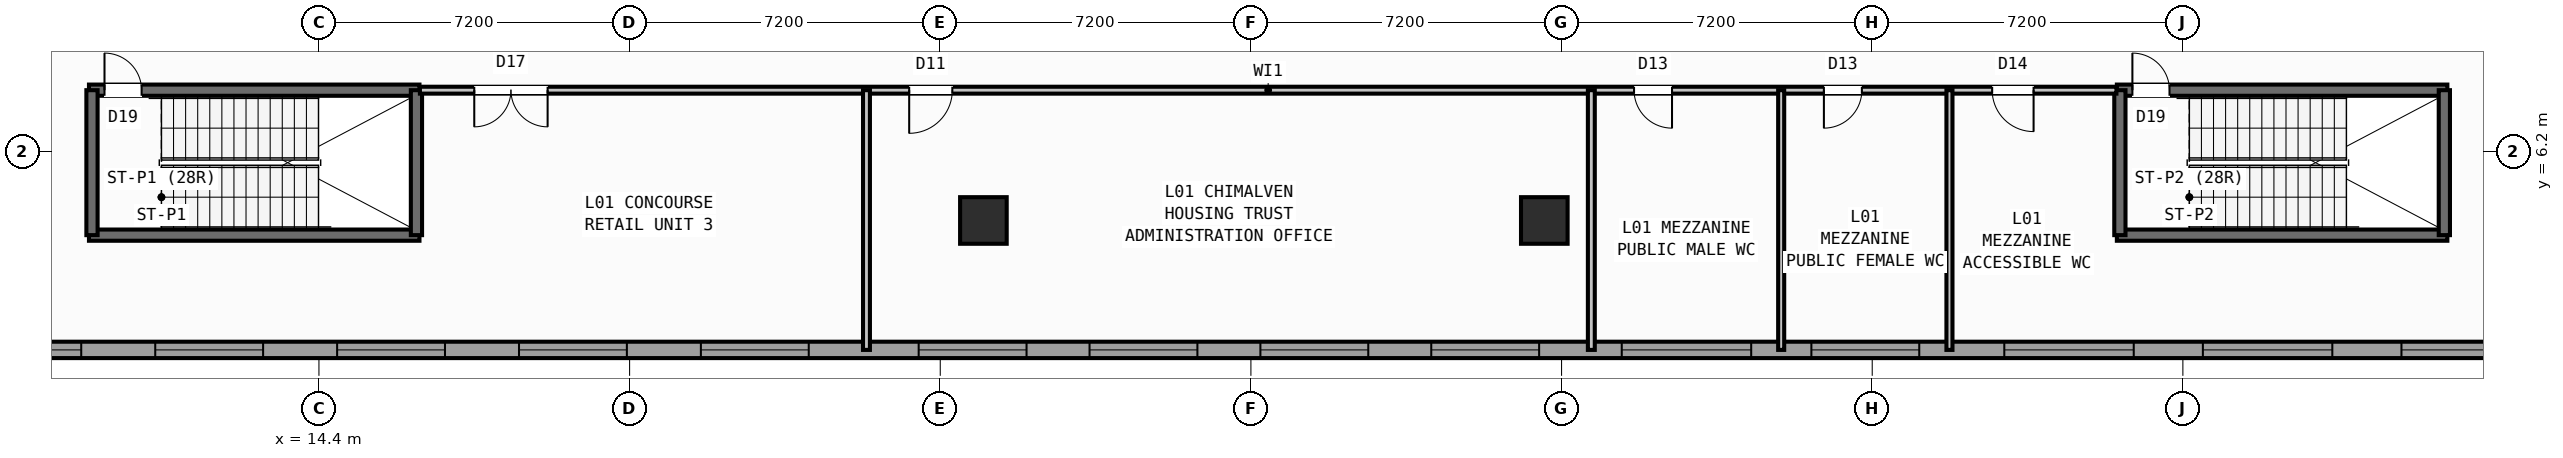
"""IFC4 building model, lengths in metres.
Left out: names, types, materials, properties, quantities, classifications, styles, units other than length and angle.
Written with IfcOpenShell. Run it as: python <this file> out.ifc"""

import sys

from ifc_helpers import new_model, si_unit, direction, frame, frame_2d, origin, origin_2d, place, context, subcontext, project, spatial, rectangle, hollow_rectangle, extrude, source, transform, mapped, element, fill, save


model = new_model("IFC4")
c1 = context("Model", 3, precision=1e-05, world=origin(), true_north=direction((0.0, 1.0)))
c2 = subcontext(c1, "Body", "Model", "MODEL_VIEW")
j1 = project(units=[si_unit("LENGTHUNIT", "METRE"), si_unit("PLANEANGLEUNIT", "RADIAN")], contexts=[c1])
p1 = place(None, origin())
s1 = spatial("IfcSite", under=j1, at=p1, CompositionType="ELEMENT")
p2 = place(p1, origin())
s2 = spatial("IfcBuilding", under=s1, at=p2, CompositionType="ELEMENT")
p3 = place(p2, frame((0.0, 0.0, 5.4)))
s3 = spatial("IfcBuildingStorey", under=s2, at=p3, CompositionType="ELEMENT", Elevation=5.4)
m1 = source(origin(), c2, "Body", "SweptSolid", [
    extrude(hollow_rectangle(XDim=1.08, YDim=1.08, WallThickness=0.04, at=origin_2d()), origin(), (0.0, 0.0, 1.0), 4.8),
])
for number, where, z_axis, x_axis in (
    (1, (29.8, 4.6, 0.0), (0.0, 0.0, 1.0), (1.0, 0.0, 0.0)),
    (2, (42.8, 4.6, 0.0), (0.0, 0.0, 1.0), (1.0, 0.0, 0.0)),
):
    element("IfcColumn", number, at=place(p3, frame(where, z_axis=z_axis, x_axis=x_axis)), inside=s3, PredefinedType="COLUMN", context=c2, shape_type="MappedRepresentation", body=[
        mapped(m1, transform((0.0, 0.0, 0.0), scale=1.0)),
    ])
p4 = place(p3, frame((67.117, 1.6, 0.0), z_axis=(0.0, 0.0, 1.0), x_axis=(-1.0, 0.0, 0.0)))
e3 = element("IfcWall", 3, at=p4, inside=s3, PredefinedType="STANDARD", context=c2, shape_type="SweptSolid", body=[
    extrude(rectangle(XDim=62.234, YDim=0.38, at=frame_2d((31.117, 0.0))), origin(), (0.0, 0.0, 1.0), 4.45),
])
p5 = place(p4, frame((1.451, 0.0, 0.7)))
e4 = element("IfcOpeningElement", 4, at=p5, cuts=e3, PredefinedType="OPENING", context=c2, shape_type="SweptSolid", body=[
    extrude(rectangle(XDim=3.0, YDim=2.3, at=frame_2d((1.5, 1.15))), frame((0.0, 0.2, 0.0), z_axis=(0.0, -1.0, 0.0), x_axis=(1.0, 0.0, 0.0)), (0.0, 0.0, 1.0), 0.4),
])
p6 = place(p4, frame((6.054, 0.0, 0.7)))
e5 = element("IfcOpeningElement", 5, at=p6, cuts=e3, PredefinedType="OPENING", context=c2, shape_type="SweptSolid", body=[
    extrude(rectangle(XDim=3.0, YDim=2.3, at=frame_2d((1.5, 1.15))), frame((0.0, 0.2, 0.0), z_axis=(0.0, -1.0, 0.0), x_axis=(1.0, 0.0, 0.0)), (0.0, 0.0, 1.0), 0.4),
])
p7 = place(p4, frame((10.656, 0.0, 0.7)))
e6 = element("IfcOpeningElement", 6, at=p7, cuts=e3, PredefinedType="OPENING", context=c2, shape_type="SweptSolid", body=[
    extrude(rectangle(XDim=3.0, YDim=2.3, at=frame_2d((1.5, 1.15))), frame((0.0, 0.2, 0.0), z_axis=(0.0, -1.0, 0.0), x_axis=(1.0, 0.0, 0.0)), (0.0, 0.0, 1.0), 0.4),
])
p8 = place(p4, frame((15.627, 0.0, 0.9)))
e7 = element("IfcOpeningElement", 7, at=p8, cuts=e3, PredefinedType="OPENING", context=c2, shape_type="SweptSolid", body=[
    extrude(rectangle(XDim=2.5, YDim=1.9, at=frame_2d((1.25, 0.95))), frame((0.0, 0.2, 0.0), z_axis=(0.0, -1.0, 0.0), x_axis=(1.0, 0.0, 0.0)), (0.0, 0.0, 1.0), 0.4),
])
p9 = place(p4, frame((19.522, 0.0, 0.7)))
e8 = element("IfcOpeningElement", 8, at=p9, cuts=e3, PredefinedType="OPENING", context=c2, shape_type="SweptSolid", body=[
    extrude(rectangle(XDim=3.0, YDim=2.3, at=frame_2d((1.5, 1.15))), frame((0.0, 0.2, 0.0), z_axis=(0.0, -1.0, 0.0), x_axis=(1.0, 0.0, 0.0)), (0.0, 0.0, 1.0), 0.4),
])
p10 = place(p4, frame((24.437, 0.0, 0.9)))
e9 = element("IfcOpeningElement", 9, at=p10, cuts=e3, PredefinedType="OPENING", context=c2, shape_type="SweptSolid", body=[
    extrude(rectangle(XDim=2.5, YDim=1.9, at=frame_2d((1.25, 0.95))), frame((0.0, 0.2, 0.0), z_axis=(0.0, -1.0, 0.0), x_axis=(1.0, 0.0, 0.0)), (0.0, 0.0, 1.0), 0.4),
])
p11 = place(p4, frame((28.397, 0.0, 0.9)))
e10 = element("IfcOpeningElement", 10, at=p11, cuts=e3, PredefinedType="OPENING", context=c2, shape_type="SweptSolid", body=[
    extrude(rectangle(XDim=2.5, YDim=1.9, at=frame_2d((1.25, 0.95))), frame((0.0, 0.2, 0.0), z_axis=(0.0, -1.0, 0.0), x_axis=(1.0, 0.0, 0.0)), (0.0, 0.0, 1.0), 0.4),
])
p12 = place(p4, frame((32.357, 0.0, 0.9)))
e11 = element("IfcOpeningElement", 11, at=p12, cuts=e3, PredefinedType="OPENING", context=c2, shape_type="SweptSolid", body=[
    extrude(rectangle(XDim=2.5, YDim=1.9, at=frame_2d((1.25, 0.95))), frame((0.0, 0.2, 0.0), z_axis=(0.0, -1.0, 0.0), x_axis=(1.0, 0.0, 0.0)), (0.0, 0.0, 1.0), 0.4),
])
p13 = place(p4, frame((36.317, 0.0, 0.9)))
e12 = element("IfcOpeningElement", 12, at=p13, cuts=e3, PredefinedType="OPENING", context=c2, shape_type="SweptSolid", body=[
    extrude(rectangle(XDim=2.5, YDim=1.9, at=frame_2d((1.25, 0.95))), frame((0.0, 0.2, 0.0), z_axis=(0.0, -1.0, 0.0), x_axis=(1.0, 0.0, 0.0)), (0.0, 0.0, 1.0), 0.4),
])
p14 = place(p4, frame((41.365, 0.0, 0.9)))
e13 = element("IfcOpeningElement", 13, at=p14, cuts=e3, PredefinedType="OPENING", context=c2, shape_type="SweptSolid", body=[
    extrude(rectangle(XDim=2.5, YDim=1.9, at=frame_2d((1.25, 0.95))), frame((0.0, 0.2, 0.0), z_axis=(0.0, -1.0, 0.0), x_axis=(1.0, 0.0, 0.0)), (0.0, 0.0, 1.0), 0.4),
])
p15 = place(p4, frame((45.58, 0.0, 0.9)))
e14 = element("IfcOpeningElement", 14, at=p15, cuts=e3, PredefinedType="OPENING", context=c2, shape_type="SweptSolid", body=[
    extrude(rectangle(XDim=2.5, YDim=1.9, at=frame_2d((1.25, 0.95))), frame((0.0, 0.2, 0.0), z_axis=(0.0, -1.0, 0.0), x_axis=(1.0, 0.0, 0.0)), (0.0, 0.0, 1.0), 0.4),
])
p16 = place(p4, frame((49.796, 0.0, 0.9)))
e15 = element("IfcOpeningElement", 15, at=p16, cuts=e3, PredefinedType="OPENING", context=c2, shape_type="SweptSolid", body=[
    extrude(rectangle(XDim=2.5, YDim=1.9, at=frame_2d((1.25, 0.95))), frame((0.0, 0.2, 0.0), z_axis=(0.0, -1.0, 0.0), x_axis=(1.0, 0.0, 0.0)), (0.0, 0.0, 1.0), 0.4),
])
p17 = place(p4, frame((54.011, 0.0, 0.9)))
e16 = element("IfcOpeningElement", 16, at=p17, cuts=e3, PredefinedType="OPENING", context=c2, shape_type="SweptSolid", body=[
    extrude(rectangle(XDim=2.5, YDim=1.9, at=frame_2d((1.25, 0.95))), frame((0.0, 0.2, 0.0), z_axis=(0.0, -1.0, 0.0), x_axis=(1.0, 0.0, 0.0)), (0.0, 0.0, 1.0), 0.4),
])
p18 = place(p4, frame((58.227, 0.0, 0.9)))
e17 = element("IfcOpeningElement", 17, at=p18, cuts=e3, PredefinedType="OPENING", context=c2, shape_type="SweptSolid", body=[
    extrude(rectangle(XDim=2.5, YDim=1.9, at=frame_2d((1.25, 0.95))), frame((0.0, 0.2, 0.0), z_axis=(0.0, -1.0, 0.0), x_axis=(1.0, 0.0, 0.0)), (0.0, 0.0, 1.0), 0.4),
])
p19 = place(p3, frame((9.07, 7.62, 0.0), z_axis=(0.0, 0.0, 1.0), x_axis=(1.0, 0.0, 0.0)))
e18 = element("IfcWall", 18, at=p19, inside=s3, PredefinedType="SHEAR", context=c2, shape_type="SweptSolid", body=[
    extrude(rectangle(XDim=7.66, YDim=0.26, at=frame_2d((3.83, 0.0))), origin(), (0.0, 0.0, 1.0), 4.6),
])
p20 = place(p19, frame((0.36, 0.0, 0.0)))
e19 = element("IfcOpeningElement", 19, at=p20, cuts=e18, PredefinedType="OPENING", context=c2, shape_type="SweptSolid", body=[
    extrude(rectangle(XDim=0.86, YDim=2.05, at=frame_2d((0.43, 1.025))), frame((0.0, 0.14, 0.0), z_axis=(0.0, -1.0, 0.0), x_axis=(1.0, 0.0, 0.0)), (0.0, 0.0, 1.0), 0.28),
])
p21 = place(p3, frame((9.07, 4.26, 0.0), z_axis=(0.0, 0.0, 1.0), x_axis=(1.0, 0.0, 0.0)))
e20 = element("IfcWall", 20, at=p21, inside=s3, PredefinedType="SHEAR", context=c2, shape_type="SweptSolid", body=[
    extrude(rectangle(XDim=7.66, YDim=0.26, at=frame_2d((3.83, 0.0))), origin(), (0.0, 0.0, 1.0), 4.6),
])
for number, where, z_axis, x_axis in (
    (21, (9.14, 4.26, 0.0), (0.0, 0.0, 1.0), (0.0, 1.0, 0.0)),
    (22, (16.66, 4.26, 0.0), (0.0, 0.0, 1.0), (0.0, 1.0, 0.0)),
):
    element("IfcWall", number, at=place(p3, frame(where, z_axis=z_axis, x_axis=x_axis)), inside=s3, PredefinedType="SHEAR", context=c2, shape_type="SweptSolid", body=[
        extrude(rectangle(XDim=3.36, YDim=0.26, at=frame_2d((1.68, 0.0))), origin(), (0.0, 0.0, 1.0), 4.6),
    ])
p22 = place(p3, frame((56.07, 7.62, 0.0), z_axis=(0.0, 0.0, 1.0), x_axis=(1.0, 0.0, 0.0)))
e23 = element("IfcWall", 23, at=p22, inside=s3, PredefinedType="SHEAR", context=c2, shape_type="SweptSolid", body=[
    extrude(rectangle(XDim=7.66, YDim=0.26, at=frame_2d((3.83, 0.0))), origin(), (0.0, 0.0, 1.0), 4.6),
])
p23 = place(p22, frame((0.36, 0.0, 0.0)))
e24 = element("IfcOpeningElement", 24, at=p23, cuts=e23, PredefinedType="OPENING", context=c2, shape_type="SweptSolid", body=[
    extrude(rectangle(XDim=0.86, YDim=2.05, at=frame_2d((0.43, 1.025))), frame((0.0, 0.14, 0.0), z_axis=(0.0, -1.0, 0.0), x_axis=(1.0, 0.0, 0.0)), (0.0, 0.0, 1.0), 0.28),
])
p24 = place(p3, frame((56.07, 4.26, 0.0), z_axis=(0.0, 0.0, 1.0), x_axis=(1.0, 0.0, 0.0)))
e25 = element("IfcWall", 25, at=p24, inside=s3, PredefinedType="SHEAR", context=c2, shape_type="SweptSolid", body=[
    extrude(rectangle(XDim=7.66, YDim=0.26, at=frame_2d((3.83, 0.0))), origin(), (0.0, 0.0, 1.0), 4.6),
])
for number, where, z_axis, x_axis in (
    (26, (56.14, 4.26, 0.0), (0.0, 0.0, 1.0), (0.0, 1.0, 0.0)),
    (27, (63.66, 4.26, 0.0), (0.0, 0.0, 1.0), (0.0, 1.0, 0.0)),
):
    element("IfcWall", number, at=place(p3, frame(where, z_axis=z_axis, x_axis=x_axis)), inside=s3, PredefinedType="SHEAR", context=c2, shape_type="SweptSolid", body=[
        extrude(rectangle(XDim=3.36, YDim=0.26, at=frame_2d((1.68, 0.0))), origin(), (0.0, 0.0, 1.0), 4.6),
    ])
p25 = place(p3, frame((16.74, 7.62, 0.0), z_axis=(0.0, 0.0, 1.0), x_axis=(1.0, 0.0, 0.0)))
e28 = element("IfcWall", 28, at=p25, inside=s3, PredefinedType="PARTITIONING", context=c2, shape_type="SweptSolid", body=[
    extrude(rectangle(XDim=39.32, YDim=0.16, at=frame_2d((19.66, 0.0))), origin(), (0.0, 0.0, 1.0), 4.44),
])
p26 = place(p25, frame((1.26, 0.0, 0.0)))
e29 = element("IfcOpeningElement", 29, at=p26, cuts=e28, PredefinedType="OPENING", context=c2, shape_type="SweptSolid", body=[
    extrude(rectangle(XDim=1.7, YDim=2.2, at=frame_2d((0.85, 1.1))), frame((0.0, 0.09, 0.0), z_axis=(0.0, -1.0, 0.0), x_axis=(1.0, 0.0, 0.0)), (0.0, 0.0, 1.0), 0.18),
])
p27 = place(p25, frame((11.34, 0.0, 0.0)))
e30 = element("IfcOpeningElement", 30, at=p27, cuts=e28, PredefinedType="OPENING", context=c2, shape_type="SweptSolid", body=[
    extrude(rectangle(XDim=1.0, YDim=2.1, at=frame_2d((0.5, 1.05))), frame((0.0, 0.09, 0.0), z_axis=(0.0, -1.0, 0.0), x_axis=(1.0, 0.0, 0.0)), (0.0, 0.0, 1.0), 0.18),
])
p28 = place(p25, frame((28.14, 0.0, 0.0)))
e31 = element("IfcOpeningElement", 31, at=p28, cuts=e28, PredefinedType="OPENING", context=c2, shape_type="SweptSolid", body=[
    extrude(rectangle(XDim=0.88, YDim=2.08, at=frame_2d((0.44, 1.04))), frame((0.0, 0.09, 0.0), z_axis=(0.0, -1.0, 0.0), x_axis=(1.0, 0.0, 0.0)), (0.0, 0.0, 1.0), 0.18),
])
p29 = place(p25, frame((32.54, 0.0, 0.0)))
e32 = element("IfcOpeningElement", 32, at=p29, cuts=e28, PredefinedType="OPENING", context=c2, shape_type="SweptSolid", body=[
    extrude(rectangle(XDim=0.88, YDim=2.08, at=frame_2d((0.44, 1.04))), frame((0.0, 0.09, 0.0), z_axis=(0.0, -1.0, 0.0), x_axis=(1.0, 0.0, 0.0)), (0.0, 0.0, 1.0), 0.18),
])
p30 = place(p25, frame((36.44, 0.0, 0.0)))
e33 = element("IfcOpeningElement", 33, at=p30, cuts=e28, PredefinedType="OPENING", context=c2, shape_type="SweptSolid", body=[
    extrude(rectangle(XDim=0.96, YDim=2.08, at=frame_2d((0.48, 1.04))), frame((0.0, 0.09, 0.0), z_axis=(0.0, -1.0, 0.0), x_axis=(1.0, 0.0, 0.0)), (0.0, 0.0, 1.0), 0.18),
])
for number, where, z_axis, x_axis in (
    (34, (27.09, 1.6, 0.0), (0.0, 0.0, 1.0), (0.0, 1.0, 0.0)),
    (35, (43.89, 1.6, 0.0), (0.0, 0.0, 1.0), (0.0, 1.0, 0.0)),
):
    element("IfcWall", number, at=place(p3, frame(where, z_axis=z_axis, x_axis=x_axis)), inside=s3, PredefinedType="PARTITIONING", context=c2, shape_type="SweptSolid", body=[
        extrude(rectangle(XDim=6.02, YDim=0.16, at=frame_2d((3.01, 0.0))), origin(), (0.0, 0.0, 1.0), 4.44),
    ])
for number, where, z_axis, x_axis in (
    (36, (48.29, 1.6, 0.0), (0.0, 0.0, 1.0), (0.0, 1.0, 0.0)),
    (37, (52.19, 1.6, 0.0), (0.0, 0.0, 1.0), (0.0, 1.0, 0.0)),
):
    element("IfcWall", number, at=place(p3, frame(where, z_axis=z_axis, x_axis=x_axis)), inside=s3, PredefinedType="PLUMBINGWALL", context=c2, shape_type="SweptSolid", body=[
        extrude(rectangle(XDim=6.02, YDim=0.14, at=frame_2d((3.01, 0.0))), origin(), (0.0, 0.0, 1.0), 4.44),
    ])
m2 = source(origin(), c2, "Body", "SweptSolid", [
    extrude(rectangle(XDim=3.0, YDim=2.3, at=frame_2d((1.5, 1.15))), frame((0.0, 0.03, 0.0), z_axis=(0.0, -1.0, 0.0), x_axis=(1.0, 0.0, 0.0)), (0.0, 0.0, 1.0), 0.06),
])
p31 = place(p5, origin())
e38 = element("IfcWindow", 38, at=p31, inside=s3, PartitioningType="SINGLE_PANEL", PredefinedType="WINDOW", context=c2, shape_type="MappedRepresentation", body=[
    mapped(m2, transform((0.0, 0.0, 0.0), scale=1.0)),
])
fill(e4, e38)
p32 = place(p6, origin())
e39 = element("IfcWindow", 39, at=p32, inside=s3, PartitioningType="SINGLE_PANEL", PredefinedType="WINDOW", context=c2, shape_type="MappedRepresentation", body=[
    mapped(m2, transform((0.0, 0.0, 0.0), scale=1.0)),
])
fill(e5, e39)
p33 = place(p7, origin())
e40 = element("IfcWindow", 40, at=p33, inside=s3, PartitioningType="SINGLE_PANEL", PredefinedType="WINDOW", context=c2, shape_type="MappedRepresentation", body=[
    mapped(m2, transform((0.0, 0.0, 0.0), scale=1.0)),
])
fill(e6, e40)
m3 = source(origin(), c2, "Body", "SweptSolid", [
    extrude(rectangle(XDim=2.5, YDim=1.9, at=frame_2d((1.25, 0.95))), frame((0.0, 0.03, 0.0), z_axis=(0.0, -1.0, 0.0), x_axis=(1.0, 0.0, 0.0)), (0.0, 0.0, 1.0), 0.06),
])
p34 = place(p8, origin())
e41 = element("IfcWindow", 41, at=p34, inside=s3, PartitioningType="SINGLE_PANEL", PredefinedType="WINDOW", context=c2, shape_type="MappedRepresentation", body=[
    mapped(m3, transform((0.0, 0.0, 0.0), scale=1.0)),
])
fill(e7, e41)
p35 = place(p9, origin())
e42 = element("IfcWindow", 42, at=p35, inside=s3, PartitioningType="SINGLE_PANEL", PredefinedType="WINDOW", context=c2, shape_type="MappedRepresentation", body=[
    mapped(m2, transform((0.0, 0.0, 0.0), scale=1.0)),
])
fill(e8, e42)
p36 = place(p10, origin())
e43 = element("IfcWindow", 43, at=p36, inside=s3, PartitioningType="SINGLE_PANEL", PredefinedType="WINDOW", context=c2, shape_type="MappedRepresentation", body=[
    mapped(m3, transform((0.0, 0.0, 0.0), scale=1.0)),
])
fill(e9, e43)
p37 = place(p11, origin())
e44 = element("IfcWindow", 44, at=p37, inside=s3, PartitioningType="SINGLE_PANEL", PredefinedType="WINDOW", context=c2, shape_type="MappedRepresentation", body=[
    mapped(m3, transform((0.0, 0.0, 0.0), scale=1.0)),
])
fill(e10, e44)
p38 = place(p12, origin())
e45 = element("IfcWindow", 45, at=p38, inside=s3, PartitioningType="SINGLE_PANEL", PredefinedType="WINDOW", context=c2, shape_type="MappedRepresentation", body=[
    mapped(m3, transform((0.0, 0.0, 0.0), scale=1.0)),
])
fill(e11, e45)
p39 = place(p13, origin())
e46 = element("IfcWindow", 46, at=p39, inside=s3, PartitioningType="SINGLE_PANEL", PredefinedType="WINDOW", context=c2, shape_type="MappedRepresentation", body=[
    mapped(m3, transform((0.0, 0.0, 0.0), scale=1.0)),
])
fill(e12, e46)
p40 = place(p14, origin())
e47 = element("IfcWindow", 47, at=p40, inside=s3, PartitioningType="SINGLE_PANEL", PredefinedType="WINDOW", context=c2, shape_type="MappedRepresentation", body=[
    mapped(m3, transform((0.0, 0.0, 0.0), scale=1.0)),
])
fill(e13, e47)
p41 = place(p15, origin())
e48 = element("IfcWindow", 48, at=p41, inside=s3, PartitioningType="SINGLE_PANEL", PredefinedType="WINDOW", context=c2, shape_type="MappedRepresentation", body=[
    mapped(m3, transform((0.0, 0.0, 0.0), scale=1.0)),
])
fill(e14, e48)
p42 = place(p16, origin())
e49 = element("IfcWindow", 49, at=p42, inside=s3, PartitioningType="SINGLE_PANEL", PredefinedType="WINDOW", context=c2, shape_type="MappedRepresentation", body=[
    mapped(m3, transform((0.0, 0.0, 0.0), scale=1.0)),
])
fill(e15, e49)
p43 = place(p17, origin())
e50 = element("IfcWindow", 50, at=p43, inside=s3, PartitioningType="SINGLE_PANEL", PredefinedType="WINDOW", context=c2, shape_type="MappedRepresentation", body=[
    mapped(m3, transform((0.0, 0.0, 0.0), scale=1.0)),
])
fill(e16, e50)
p44 = place(p18, origin())
e51 = element("IfcWindow", 51, at=p44, inside=s3, PartitioningType="SINGLE_PANEL", PredefinedType="WINDOW", context=c2, shape_type="MappedRepresentation", body=[
    mapped(m3, transform((0.0, 0.0, 0.0), scale=1.0)),
])
fill(e17, e51)
m4 = source(origin(), c2, "Body", "SweptSolid", [
    extrude(rectangle(XDim=0.86, YDim=2.05, at=frame_2d((0.43, 1.025))), frame((0.0, 0.025, 0.0), z_axis=(0.0, -1.0, 0.0), x_axis=(1.0, 0.0, 0.0)), (0.0, 0.0, 1.0), 0.05),
])
p45 = place(p20, origin())
e52 = element("IfcDoor", 52, at=p45, inside=s3, OperationType="SINGLE_SWING_LEFT", PredefinedType="DOOR", context=c2, shape_type="MappedRepresentation", body=[
    mapped(m4, transform((0.0, 0.0, 0.0), scale=1.0)),
])
fill(e19, e52)
p46 = place(p23, origin())
e53 = element("IfcDoor", 53, at=p46, inside=s3, OperationType="SINGLE_SWING_LEFT", PredefinedType="DOOR", context=c2, shape_type="MappedRepresentation", body=[
    mapped(m4, transform((0.0, 0.0, 0.0), scale=1.0)),
])
fill(e24, e53)
m5 = source(origin(), c2, "Body", "SweptSolid", [
    extrude(rectangle(XDim=1.7, YDim=2.2, at=frame_2d((0.85, 1.1))), frame((0.0, 0.025, 0.0), z_axis=(0.0, -1.0, 0.0), x_axis=(1.0, 0.0, 0.0)), (0.0, 0.0, 1.0), 0.05),
])
p47 = place(p26, frame((1.7, 0.0, 0.0), z_axis=(0.0, 0.0, 1.0), x_axis=(-1.0, 0.0, 0.0)))
e54 = element("IfcDoor", 54, at=p47, inside=s3, OperationType="DOUBLE_DOOR_SINGLE_SWING", PredefinedType="DOOR", context=c2, shape_type="MappedRepresentation", body=[
    mapped(m5, transform((0.0, 0.0, 0.0), scale=1.0)),
])
fill(e29, e54)
m6 = source(origin(), c2, "Body", "SweptSolid", [
    extrude(rectangle(XDim=1.0, YDim=2.1, at=frame_2d((0.5, 1.05))), frame((0.0, 0.025, 0.0), z_axis=(0.0, -1.0, 0.0), x_axis=(1.0, 0.0, 0.0)), (0.0, 0.0, 1.0), 0.05),
])
p48 = place(p27, frame((1.0, 0.0, 0.0), z_axis=(0.0, 0.0, 1.0), x_axis=(-1.0, 0.0, 0.0)))
e55 = element("IfcDoor", 55, at=p48, inside=s3, OperationType="SINGLE_SWING_RIGHT", PredefinedType="DOOR", context=c2, shape_type="MappedRepresentation", body=[
    mapped(m6, transform((0.0, 0.0, 0.0), scale=1.0)),
])
fill(e30, e55)
m7 = source(origin(), c2, "Body", "SweptSolid", [
    extrude(rectangle(XDim=0.88, YDim=2.08, at=frame_2d((0.44, 1.04))), frame((0.0, 0.025, 0.0), z_axis=(0.0, -1.0, 0.0), x_axis=(1.0, 0.0, 0.0)), (0.0, 0.0, 1.0), 0.05),
])
p49 = place(p28, frame((0.88, 0.0, 0.0), z_axis=(0.0, 0.0, 1.0), x_axis=(-1.0, 0.0, 0.0)))
e56 = element("IfcDoor", 56, at=p49, inside=s3, OperationType="SINGLE_SWING_LEFT", PredefinedType="DOOR", context=c2, shape_type="MappedRepresentation", body=[
    mapped(m7, transform((0.0, 0.0, 0.0), scale=1.0)),
])
fill(e31, e56)
p50 = place(p29, frame((0.88, 0.0, 0.0), z_axis=(0.0, 0.0, 1.0), x_axis=(-1.0, 0.0, 0.0)))
e57 = element("IfcDoor", 57, at=p50, inside=s3, OperationType="SINGLE_SWING_RIGHT", PredefinedType="DOOR", context=c2, shape_type="MappedRepresentation", body=[
    mapped(m7, transform((0.0, 0.0, 0.0), scale=1.0)),
])
fill(e32, e57)
m8 = source(origin(), c2, "Body", "SweptSolid", [
    extrude(rectangle(XDim=0.96, YDim=2.08, at=frame_2d((0.48, 1.04))), frame((0.0, 0.025, 0.0), z_axis=(0.0, -1.0, 0.0), x_axis=(1.0, 0.0, 0.0)), (0.0, 0.0, 1.0), 0.05),
])
p51 = place(p30, frame((0.96, 0.0, 0.0), z_axis=(0.0, 0.0, 1.0), x_axis=(-1.0, 0.0, 0.0)))
e58 = element("IfcDoor", 58, at=p51, inside=s3, OperationType="SINGLE_SWING_LEFT", PredefinedType="DOOR", context=c2, shape_type="MappedRepresentation", body=[
    mapped(m8, transform((0.0, 0.0, 0.0), scale=1.0)),
])
fill(e33, e58)
save(model, sys.argv[1])
